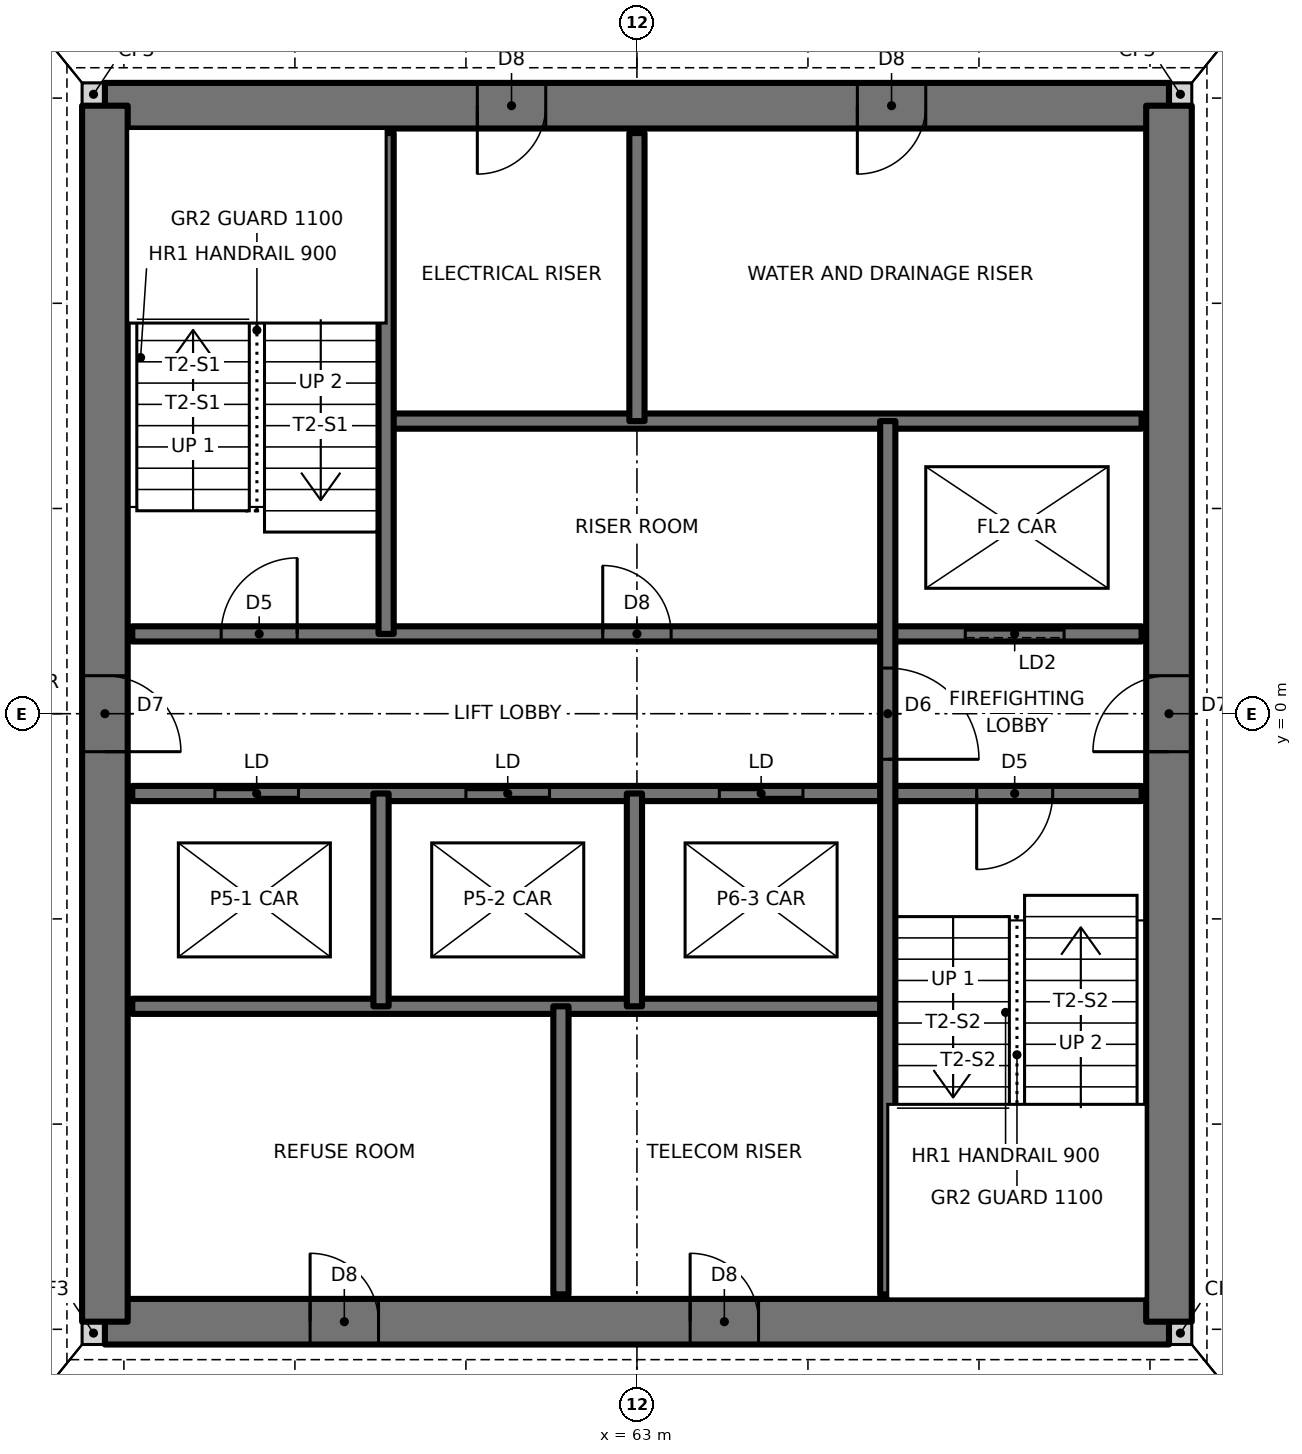
"""IFC4 building model, lengths in metres.
Left out: names, types, materials, properties, quantities, classifications, styles, units other than length and angle.
Written with IfcOpenShell. Run it as: python <this file> out.ifc"""

import sys

from ifc_helpers import new_model, si_unit, direction, frame, frame_2d, origin, place, context, subcontext, project, spatial, rectangle, extrude, element, fill, save


model = new_model("IFC4")
c1 = context("Model", 3, precision=1e-05, world=origin(), true_north=direction((0.0, 1.0)))
c2 = subcontext(c1, "Body", "Model", "MODEL_VIEW")
j1 = project(units=[si_unit("LENGTHUNIT", "METRE"), si_unit("PLANEANGLEUNIT", "RADIAN")], contexts=[c1])
p1 = place(None, origin())
s1 = spatial("IfcSite", under=j1, at=p1, CompositionType="ELEMENT")
p2 = place(p1, origin())
s2 = spatial("IfcBuilding", under=s1, at=p2, CompositionType="ELEMENT")
p3 = place(p2, frame((0.0, 0.0, 87.5)))
s3 = spatial("IfcBuildingStorey", under=s2, at=p3, CompositionType="ELEMENT", Elevation=87.5)
for number, where, z_axis, x_axis in (
    (1, (55.7, -8.15, 0.0), (0.0, 0.0, 1.0), (1.0, 0.0, 0.0)),
    (2, (70.0, -8.15, 0.0), (0.0, 0.0, 1.0), (1.0, 0.0, 0.0)),
    (3, (70.0, 8.15, 0.0), (0.0, 0.0, 1.0), (1.0, 0.0, 0.0)),
    (4, (55.7, 8.15, 0.0), (0.0, 0.0, 1.0), (1.0, 0.0, 0.0)),
):
    element("IfcWall", number, at=place(p3, frame(where, z_axis=z_axis, x_axis=x_axis)), inside=s3, PredefinedType="SOLIDWALL", context=c2, shape_type="SweptSolid", body=[
        extrude(rectangle(XDim=0.3, YDim=0.3, at=frame_2d((0.15, 0.0))), origin(), (0.0, 0.0, 1.0), 3.5),
    ])
p4 = place(p3, frame((56.0, -8.0, 0.0), z_axis=(0.0, 0.0, 1.0), x_axis=(1.0, 0.0, 0.0)))
e5 = element("IfcWall", 5, at=p4, inside=s3, PredefinedType="SHEAR", context=c2, shape_type="SweptSolid", body=[
    extrude(rectangle(XDim=14.0, YDim=0.6, at=frame_2d((7.0, 0.0))), origin(), (0.0, 0.0, 1.0), 3.5),
])
p5 = place(p4, frame((2.7, 0.0, 0.0)))
e6 = element("IfcOpeningElement", 6, at=p5, cuts=e5, PredefinedType="OPENING", context=c2, shape_type="SweptSolid", body=[
    extrude(rectangle(XDim=0.9, YDim=2.1, at=frame_2d((0.45, 1.05))), frame((0.0, 0.31, 0.0), z_axis=(0.0, -1.0, 0.0), x_axis=(1.0, 0.0, 0.0)), (0.0, 0.0, 1.0), 0.62),
])
p6 = place(p4, frame((7.7, 0.0, 0.0)))
e7 = element("IfcOpeningElement", 7, at=p6, cuts=e5, PredefinedType="OPENING", context=c2, shape_type="SweptSolid", body=[
    extrude(rectangle(XDim=0.9, YDim=2.1, at=frame_2d((0.45, 1.05))), frame((0.0, 0.31, 0.0), z_axis=(0.0, -1.0, 0.0), x_axis=(1.0, 0.0, 0.0)), (0.0, 0.0, 1.0), 0.62),
])
p7 = place(p3, frame((70.0, 8.0, 0.0), z_axis=(0.0, 0.0, 1.0), x_axis=(-1.0, 0.0, 0.0)))
e8 = element("IfcWall", 8, at=p7, inside=s3, PredefinedType="SHEAR", context=c2, shape_type="SweptSolid", body=[
    extrude(rectangle(XDim=14.0, YDim=0.6, at=frame_2d((7.0, 0.0))), origin(), (0.0, 0.0, 1.0), 3.5),
])
p8 = place(p7, frame((8.2, 0.0, 0.0)))
e9 = element("IfcOpeningElement", 9, at=p8, cuts=e8, PredefinedType="OPENING", context=c2, shape_type="SweptSolid", body=[
    extrude(rectangle(XDim=0.9, YDim=2.1, at=frame_2d((0.45, 1.05))), frame((0.0, 0.31, 0.0), z_axis=(0.0, -1.0, 0.0), x_axis=(1.0, 0.0, 0.0)), (0.0, 0.0, 1.0), 0.62),
])
p9 = place(p7, frame((3.2, 0.0, 0.0)))
e10 = element("IfcOpeningElement", 10, at=p9, cuts=e8, PredefinedType="OPENING", context=c2, shape_type="SweptSolid", body=[
    extrude(rectangle(XDim=0.9, YDim=2.1, at=frame_2d((0.45, 1.05))), frame((0.0, 0.31, 0.0), z_axis=(0.0, -1.0, 0.0), x_axis=(1.0, 0.0, 0.0)), (0.0, 0.0, 1.0), 0.62),
])
p10 = place(p3, frame((70.0, -8.0, 0.0), z_axis=(0.0, 0.0, 1.0), x_axis=(0.0, 1.0, 0.0)))
e11 = element("IfcWall", 11, at=p10, inside=s3, PredefinedType="SHEAR", context=c2, shape_type="SweptSolid", body=[
    extrude(rectangle(XDim=16.0, YDim=0.6, at=frame_2d((8.0, 0.0))), origin(), (0.0, 0.0, 1.0), 3.5),
])
p11 = place(p10, frame((7.5, 0.0, 0.0)))
e12 = element("IfcOpeningElement", 12, at=p11, cuts=e11, PredefinedType="OPENING", context=c2, shape_type="SweptSolid", body=[
    extrude(rectangle(XDim=1.0, YDim=2.1, at=frame_2d((0.5, 1.05))), frame((0.0, 0.31, 0.0), z_axis=(0.0, -1.0, 0.0), x_axis=(1.0, 0.0, 0.0)), (0.0, 0.0, 1.0), 0.62),
])
p12 = place(p3, frame((56.0, 8.0, 0.0), z_axis=(0.0, 0.0, 1.0), x_axis=(0.0, -1.0, 0.0)))
e13 = element("IfcWall", 13, at=p12, inside=s3, PredefinedType="SHEAR", context=c2, shape_type="SweptSolid", body=[
    extrude(rectangle(XDim=16.0, YDim=0.6, at=frame_2d((8.0, 0.0))), origin(), (0.0, 0.0, 1.0), 3.5),
])
p13 = place(p12, frame((7.5, 0.0, 0.0)))
e14 = element("IfcOpeningElement", 14, at=p13, cuts=e13, PredefinedType="OPENING", context=c2, shape_type="SweptSolid", body=[
    extrude(rectangle(XDim=1.0, YDim=2.1, at=frame_2d((0.5, 1.05))), frame((0.0, 0.31, 0.0), z_axis=(0.0, -1.0, 0.0), x_axis=(1.0, 0.0, 0.0)), (0.0, 0.0, 1.0), 0.62),
])
p14 = place(p3, frame((56.36, -3.85, 0.0), z_axis=(0.0, 0.0, 1.0), x_axis=(1.0, 0.0, 0.0)))
e15 = element("IfcWall", 15, at=p14, inside=s3, PredefinedType="SOLIDWALL", context=c2, shape_type="SweptSolid", body=[
    extrude(rectangle(XDim=9.94, YDim=0.2, at=frame_2d((4.97, 0.0))), origin(), (0.0, 0.0, 1.0), 3.5),
])
p15 = place(p3, frame((56.36, -1.05, 0.0), z_axis=(0.0, 0.0, 1.0), x_axis=(1.0, 0.0, 0.0)))
e16 = element("IfcWall", 16, at=p15, inside=s3, PredefinedType="SOLIDWALL", context=c2, shape_type="SweptSolid", body=[
    extrude(rectangle(XDim=13.28, YDim=0.2, at=frame_2d((6.64, 0.0))), origin(), (0.0, 0.0, 1.0), 3.5),
])
p16 = place(p15, frame((11.11, 0.0, 0.0)))
e17 = element("IfcOpeningElement", 17, at=p16, cuts=e16, PredefinedType="OPENING", context=c2, shape_type="SweptSolid", body=[
    extrude(rectangle(XDim=1.0, YDim=2.1, at=frame_2d((0.5, 1.05))), frame((0.0, 0.11, 0.0), z_axis=(0.0, -1.0, 0.0), x_axis=(1.0, 0.0, 0.0)), (0.0, 0.0, 1.0), 0.22),
])
p17 = place(p15, frame((1.087, 0.0, 0.0)))
e18 = element("IfcOpeningElement", 18, at=p17, cuts=e16, PredefinedType="OPENING", context=c2, shape_type="SweptSolid", body=[
    extrude(rectangle(XDim=1.1, YDim=2.1, at=frame_2d((0.55, 1.05))), frame((0.0, 0.11, 0.0), z_axis=(0.0, -1.0, 0.0), x_axis=(1.0, 0.0, 0.0)), (0.0, 0.0, 1.0), 0.22),
])
p18 = place(p15, frame((4.39, 0.0, 0.0)))
e19 = element("IfcOpeningElement", 19, at=p18, cuts=e16, PredefinedType="OPENING", context=c2, shape_type="SweptSolid", body=[
    extrude(rectangle(XDim=1.1, YDim=2.1, at=frame_2d((0.55, 1.05))), frame((0.0, 0.11, 0.0), z_axis=(0.0, -1.0, 0.0), x_axis=(1.0, 0.0, 0.0)), (0.0, 0.0, 1.0), 0.22),
])
p19 = place(p15, frame((7.724, 0.0, 0.0)))
e20 = element("IfcOpeningElement", 20, at=p19, cuts=e16, PredefinedType="OPENING", context=c2, shape_type="SweptSolid", body=[
    extrude(rectangle(XDim=1.1, YDim=2.1, at=frame_2d((0.55, 1.05))), frame((0.0, 0.11, 0.0), z_axis=(0.0, -1.0, 0.0), x_axis=(1.0, 0.0, 0.0)), (0.0, 0.0, 1.0), 0.22),
])
p20 = place(p3, frame((56.36, 1.05, 0.0), z_axis=(0.0, 0.0, 1.0), x_axis=(1.0, 0.0, 0.0)))
e21 = element("IfcWall", 21, at=p20, inside=s3, PredefinedType="SOLIDWALL", context=c2, shape_type="SweptSolid", body=[
    extrude(rectangle(XDim=13.28, YDim=0.2, at=frame_2d((6.64, 0.0))), origin(), (0.0, 0.0, 1.0), 3.5),
])
p21 = place(p20, frame((1.17, 0.0, 0.0)))
e22 = element("IfcOpeningElement", 22, at=p21, cuts=e21, PredefinedType="OPENING", context=c2, shape_type="SweptSolid", body=[
    extrude(rectangle(XDim=1.0, YDim=2.1, at=frame_2d((0.5, 1.05))), frame((0.0, 0.11, 0.0), z_axis=(0.0, -1.0, 0.0), x_axis=(1.0, 0.0, 0.0)), (0.0, 0.0, 1.0), 0.22),
])
p22 = place(p20, frame((6.19, 0.0, 0.0)))
e23 = element("IfcOpeningElement", 23, at=p22, cuts=e21, PredefinedType="OPENING", context=c2, shape_type="SweptSolid", body=[
    extrude(rectangle(XDim=0.9, YDim=2.1, at=frame_2d((0.45, 1.05))), frame((0.0, 0.11, 0.0), z_axis=(0.0, -1.0, 0.0), x_axis=(1.0, 0.0, 0.0)), (0.0, 0.0, 1.0), 0.22),
])
p23 = place(p20, frame((10.96, 0.0, 0.0)))
e24 = element("IfcOpeningElement", 24, at=p23, cuts=e21, PredefinedType="OPENING", context=c2, shape_type="SweptSolid", body=[
    extrude(rectangle(XDim=1.3, YDim=2.1, at=frame_2d((0.65, 1.05))), frame((0.0, 0.11, 0.0), z_axis=(0.0, -1.0, 0.0), x_axis=(1.0, 0.0, 0.0)), (0.0, 0.0, 1.0), 0.22),
])
p24 = place(p3, frame((59.7, 3.85, 0.0), z_axis=(0.0, 0.0, 1.0), x_axis=(1.0, 0.0, 0.0)))
e25 = element("IfcWall", 25, at=p24, inside=s3, PredefinedType="SOLIDWALL", context=c2, shape_type="SweptSolid", body=[
    extrude(rectangle(XDim=9.94, YDim=0.2, at=frame_2d((4.97, 0.0))), origin(), (0.0, 0.0, 1.0), 3.5),
])
p25 = place(p3, frame((66.3, -7.64, 0.0), z_axis=(0.0, 0.0, 1.0), x_axis=(0.0, 1.0, 0.0)))
e26 = element("IfcWall", 26, at=p25, inside=s3, PredefinedType="SOLIDWALL", context=c2, shape_type="SweptSolid", body=[
    extrude(rectangle(XDim=11.49, YDim=0.2, at=frame_2d((5.745, 0.0))), origin(), (0.0, 0.0, 1.0), 3.5),
])
p26 = place(p25, frame((7.04, 0.0, 0.0)))
e27 = element("IfcOpeningElement", 27, at=p26, cuts=e26, PredefinedType="OPENING", context=c2, shape_type="SweptSolid", body=[
    extrude(rectangle(XDim=1.2, YDim=2.1, at=frame_2d((0.6, 1.05))), frame((0.0, 0.11, 0.0), z_axis=(0.0, -1.0, 0.0), x_axis=(1.0, 0.0, 0.0)), (0.0, 0.0, 1.0), 0.22),
])
p27 = place(p3, frame((63.0, 3.85, 0.0), z_axis=(0.0, 0.0, 1.0), x_axis=(0.0, 1.0, 0.0)))
e28 = element("IfcWall", 28, at=p27, inside=s3, PredefinedType="SOLIDWALL", context=c2, shape_type="SweptSolid", body=[
    extrude(rectangle(XDim=3.79, YDim=0.2, at=frame_2d((1.895, 0.0))), origin(), (0.0, 0.0, 1.0), 3.5),
])
p28 = place(p3, frame((62.967, -3.85, 0.0), z_axis=(0.0, 0.0, 1.0), x_axis=(0.0, 1.0, 0.0)))
e29 = element("IfcWall", 29, at=p28, inside=s3, PredefinedType="SOLIDWALL", context=c2, shape_type="SweptSolid", body=[
    extrude(rectangle(XDim=2.8, YDim=0.2, at=frame_2d((1.4, 0.0))), origin(), (0.0, 0.0, 1.0), 3.5),
])
p29 = place(p3, frame((62.0, -7.64, 0.0), z_axis=(0.0, 0.0, 1.0), x_axis=(0.0, 1.0, 0.0)))
e30 = element("IfcWall", 30, at=p29, inside=s3, PredefinedType="SOLIDWALL", context=c2, shape_type="SweptSolid", body=[
    extrude(rectangle(XDim=3.79, YDim=0.2, at=frame_2d((1.895, 0.0))), origin(), (0.0, 0.0, 1.0), 3.5),
])
p30 = place(p3, frame((59.7, 1.05, 0.0), z_axis=(0.0, 0.0, 1.0), x_axis=(0.0, 1.0, 0.0)))
e31 = element("IfcWall", 31, at=p30, inside=s3, PredefinedType="SOLIDWALL", context=c2, shape_type="SweptSolid", body=[
    extrude(rectangle(XDim=6.59, YDim=0.2, at=frame_2d((3.295, 0.0))), origin(), (0.0, 0.0, 1.0), 3.5),
])
p31 = place(p3, frame((59.633, -3.85, 0.0), z_axis=(0.0, 0.0, 1.0), x_axis=(0.0, 1.0, 0.0)))
e32 = element("IfcWall", 32, at=p31, inside=s3, PredefinedType="SOLIDWALL", context=c2, shape_type="SweptSolid", body=[
    extrude(rectangle(XDim=2.8, YDim=0.2, at=frame_2d((1.4, 0.0))), origin(), (0.0, 0.0, 1.0), 3.5),
])
p32 = place(p21, origin())
e33 = element("IfcDoor", 33, at=p32, inside=s3, OperationType="SINGLE_SWING_RIGHT", PredefinedType="DOOR", context=c2, shape_type="SweptSolid", body=[
    extrude(rectangle(XDim=1.0, YDim=2.1, at=frame_2d((0.5, 1.05))), frame((0.0, 0.025, 0.0), z_axis=(0.0, -1.0, 0.0), x_axis=(1.0, 0.0, 0.0)), (0.0, 0.0, 1.0), 0.05),
])
fill(e22, e33)
p33 = place(p16, frame((1.0, 0.0, 0.0), z_axis=(0.0, 0.0, 1.0), x_axis=(-1.0, 0.0, 0.0)))
e34 = element("IfcDoor", 34, at=p33, inside=s3, OperationType="SINGLE_SWING_RIGHT", PredefinedType="DOOR", context=c2, shape_type="SweptSolid", body=[
    extrude(rectangle(XDim=1.0, YDim=2.1, at=frame_2d((0.5, 1.05))), frame((0.0, 0.025, 0.0), z_axis=(0.0, -1.0, 0.0), x_axis=(1.0, 0.0, 0.0)), (0.0, 0.0, 1.0), 0.05),
])
fill(e17, e34)
p34 = place(p26, frame((1.2, 0.0, 0.0), z_axis=(0.0, 0.0, 1.0), x_axis=(-1.0, 0.0, 0.0)))
e35 = element("IfcDoor", 35, at=p34, inside=s3, OperationType="SINGLE_SWING_RIGHT", PredefinedType="DOOR", context=c2, shape_type="SweptSolid", body=[
    extrude(rectangle(XDim=1.2, YDim=2.1, at=frame_2d((0.6, 1.05))), frame((0.0, 0.025, 0.0), z_axis=(0.0, -1.0, 0.0), x_axis=(1.0, 0.0, 0.0)), (0.0, 0.0, 1.0), 0.05),
])
fill(e27, e35)
p35 = place(p22, origin())
e36 = element("IfcDoor", 36, at=p35, inside=s3, OperationType="SINGLE_SWING_LEFT", PredefinedType="DOOR", context=c2, shape_type="SweptSolid", body=[
    extrude(rectangle(XDim=0.9, YDim=2.1, at=frame_2d((0.45, 1.05))), frame((0.0, 0.025, 0.0), z_axis=(0.0, -1.0, 0.0), x_axis=(1.0, 0.0, 0.0)), (0.0, 0.0, 1.0), 0.05),
])
fill(e23, e36)
p36 = place(p13, origin())
e37 = element("IfcDoor", 37, at=p36, inside=s3, OperationType="SINGLE_SWING_RIGHT", PredefinedType="DOOR", context=c2, shape_type="SweptSolid", body=[
    extrude(rectangle(XDim=1.0, YDim=2.1, at=frame_2d((0.5, 1.05))), frame((0.0, 0.025, 0.0), z_axis=(0.0, -1.0, 0.0), x_axis=(1.0, 0.0, 0.0)), (0.0, 0.0, 1.0), 0.05),
])
fill(e14, e37)
p37 = place(p11, origin())
e38 = element("IfcDoor", 38, at=p37, inside=s3, OperationType="SINGLE_SWING_LEFT", PredefinedType="DOOR", context=c2, shape_type="SweptSolid", body=[
    extrude(rectangle(XDim=1.0, YDim=2.1, at=frame_2d((0.5, 1.05))), frame((0.0, 0.025, 0.0), z_axis=(0.0, -1.0, 0.0), x_axis=(1.0, 0.0, 0.0)), (0.0, 0.0, 1.0), 0.05),
])
fill(e12, e38)
p38 = place(p8, origin())
e39 = element("IfcDoor", 39, at=p38, inside=s3, OperationType="SINGLE_SWING_RIGHT", PredefinedType="DOOR", context=c2, shape_type="SweptSolid", body=[
    extrude(rectangle(XDim=0.9, YDim=2.1, at=frame_2d((0.45, 1.05))), frame((0.0, 0.025, 0.0), z_axis=(0.0, -1.0, 0.0), x_axis=(1.0, 0.0, 0.0)), (0.0, 0.0, 1.0), 0.05),
])
fill(e9, e39)
p39 = place(p9, origin())
e40 = element("IfcDoor", 40, at=p39, inside=s3, OperationType="SINGLE_SWING_RIGHT", PredefinedType="DOOR", context=c2, shape_type="SweptSolid", body=[
    extrude(rectangle(XDim=0.9, YDim=2.1, at=frame_2d((0.45, 1.05))), frame((0.0, 0.025, 0.0), z_axis=(0.0, -1.0, 0.0), x_axis=(1.0, 0.0, 0.0)), (0.0, 0.0, 1.0), 0.05),
])
fill(e10, e40)
p40 = place(p5, origin())
e41 = element("IfcDoor", 41, at=p40, inside=s3, OperationType="SINGLE_SWING_LEFT", PredefinedType="DOOR", context=c2, shape_type="SweptSolid", body=[
    extrude(rectangle(XDim=0.9, YDim=2.1, at=frame_2d((0.45, 1.05))), frame((0.0, 0.025, 0.0), z_axis=(0.0, -1.0, 0.0), x_axis=(1.0, 0.0, 0.0)), (0.0, 0.0, 1.0), 0.05),
])
fill(e6, e41)
p41 = place(p6, origin())
e42 = element("IfcDoor", 42, at=p41, inside=s3, OperationType="SINGLE_SWING_LEFT", PredefinedType="DOOR", context=c2, shape_type="SweptSolid", body=[
    extrude(rectangle(XDim=0.9, YDim=2.1, at=frame_2d((0.45, 1.05))), frame((0.0, 0.025, 0.0), z_axis=(0.0, -1.0, 0.0), x_axis=(1.0, 0.0, 0.0)), (0.0, 0.0, 1.0), 0.05),
])
fill(e7, e42)
p42 = place(p17, origin())
e43 = element("IfcDoor", 43, at=p42, inside=s3, OperationType="DOUBLE_DOOR_SLIDING", PredefinedType="DOOR", context=c2, shape_type="SweptSolid", body=[
    extrude(rectangle(XDim=1.1, YDim=2.1, at=frame_2d((0.55, 1.05))), frame((0.0, 0.025, 0.0), z_axis=(0.0, -1.0, 0.0), x_axis=(1.0, 0.0, 0.0)), (0.0, 0.0, 1.0), 0.05),
])
fill(e18, e43)
p43 = place(p18, origin())
e44 = element("IfcDoor", 44, at=p43, inside=s3, OperationType="DOUBLE_DOOR_SLIDING", PredefinedType="DOOR", context=c2, shape_type="SweptSolid", body=[
    extrude(rectangle(XDim=1.1, YDim=2.1, at=frame_2d((0.55, 1.05))), frame((0.0, 0.025, 0.0), z_axis=(0.0, -1.0, 0.0), x_axis=(1.0, 0.0, 0.0)), (0.0, 0.0, 1.0), 0.05),
])
fill(e19, e44)
p44 = place(p19, origin())
e45 = element("IfcDoor", 45, at=p44, inside=s3, OperationType="DOUBLE_DOOR_SLIDING", PredefinedType="DOOR", context=c2, shape_type="SweptSolid", body=[
    extrude(rectangle(XDim=1.1, YDim=2.1, at=frame_2d((0.55, 1.05))), frame((0.0, 0.025, 0.0), z_axis=(0.0, -1.0, 0.0), x_axis=(1.0, 0.0, 0.0)), (0.0, 0.0, 1.0), 0.05),
])
fill(e20, e45)
p45 = place(p23, origin())
e46 = element("IfcDoor", 46, at=p45, inside=s3, OperationType="SLIDING_TO_LEFT", PredefinedType="DOOR", context=c2, shape_type="SweptSolid", body=[
    extrude(rectangle(XDim=1.3, YDim=2.1, at=frame_2d((0.65, 1.05))), frame((0.0, 0.025, 0.0), z_axis=(0.0, -1.0, 0.0), x_axis=(1.0, 0.0, 0.0)), (0.0, 0.0, 1.0), 0.05),
])
fill(e24, e46)
save(model, sys.argv[1])
